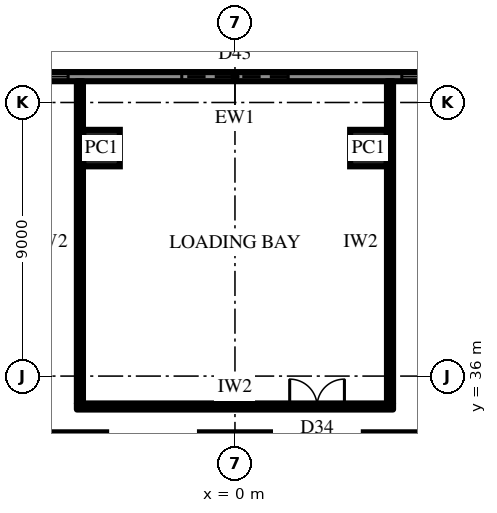
"""IFC4 building model, lengths in metres.
Left out: names, types, materials, properties, quantities, classifications, styles, units other than length and angle.
Written with IfcOpenShell. Run it as: python <this file> out.ifc"""

import sys

from ifc_helpers import new_model, si_unit, direction, frame, frame_2d, origin, origin_2d, place, context, subcontext, project, spatial, rectangle, extrude, element, fill, save


model = new_model("IFC4")
c1 = context("Model", 3, precision=1e-05, world=origin(), true_north=direction((0.0, 1.0)))
c2 = subcontext(c1, "Body", "Model", "MODEL_VIEW")
j1 = project(units=[si_unit("LENGTHUNIT", "METRE"), si_unit("PLANEANGLEUNIT", "RADIAN")], contexts=[c1])
p1 = place(None, origin())
s1 = spatial("IfcSite", under=j1, at=p1, CompositionType="ELEMENT")
p2 = place(p1, origin())
s2 = spatial("IfcBuilding", under=s1, at=p2, CompositionType="ELEMENT")
p3 = place(p2, origin())
s3 = spatial("IfcBuildingStorey", under=s2, at=p3, CompositionType="ELEMENT", Elevation=0.0)
for number, where, z_axis, x_axis in (
    (1, (5.389, 33.15, 0.0), (0.0, 0.0, 1.0), (-1.0, 0.0, 0.0)),
    (2, (0.0, 33.15, 0.0), (0.0, 0.0, 1.0), (-1.0, 0.0, 0.0)),
    (3, (-5.389, 33.15, 0.0), (0.0, 0.0, 1.0), (-1.0, 0.0, 0.0)),
):
    element("IfcColumn", number, at=place(p3, frame(where, z_axis=z_axis, x_axis=x_axis)), inside=s3, PredefinedType="COLUMN", context=c2, shape_type="SweptSolid", body=[
        extrude(rectangle(XDim=2.3, YDim=2.0, at=origin_2d()), origin(), (0.0, 0.0, 1.0), 7.0),
    ])
for number, where, z_axis, x_axis in (
    (4, (4.388, 43.5, 0.0), (0.0, 0.0, 1.0), (-1.0, 0.0, 0.0)),
    (5, (-4.388, 43.5, 0.0), (0.0, 0.0, 1.0), (-1.0, 0.0, 0.0)),
):
    element("IfcColumn", number, at=place(p3, frame(where, z_axis=z_axis, x_axis=x_axis)), inside=s3, PredefinedType="COLUMN", context=c2, shape_type="SweptSolid", body=[
        extrude(rectangle(XDim=1.2, YDim=1.2, at=origin_2d()), origin(), (0.0, 0.0, 1.0), 7.0),
    ])
p4 = place(p3, frame((21.939, 45.85, 0.0), z_axis=(0.0, 0.0, 1.0), x_axis=(-1.0, 0.0, 0.0)))
e6 = element("IfcWall", 6, at=p4, inside=s3, PredefinedType="SOLIDWALL", context=c2, shape_type="SweptSolid", body=[
    extrude(rectangle(XDim=43.878, YDim=0.3, at=frame_2d((21.939, 0.0))), origin(), (0.0, 0.0, 1.0), 6.65),
])
p5 = place(p4, frame((1.1, 0.0, 0.3)))
e7 = element("IfcOpeningElement", 7, at=p5, cuts=e6, PredefinedType="OPENING", context=c2, shape_type="SweptSolid", body=[
    extrude(rectangle(XDim=6.576, YDim=5.0, at=frame_2d((3.288, 2.5))), frame((0.0, 0.16, 0.0), z_axis=(0.0, -1.0, 0.0), x_axis=(1.0, 0.0, 0.0)), (0.0, 0.0, 1.0), 0.32),
])
p6 = place(p4, frame((9.875, 0.0, 0.0)))
e8 = element("IfcOpeningElement", 8, at=p6, cuts=e6, PredefinedType="OPENING", context=c2, shape_type="SweptSolid", body=[
    extrude(rectangle(XDim=1.8, YDim=2.4, at=frame_2d((0.9, 1.2))), frame((0.0, 0.16, 0.0), z_axis=(0.0, -1.0, 0.0), x_axis=(1.0, 0.0, 0.0)), (0.0, 0.0, 1.0), 0.32),
])
p7 = place(p4, frame((11.976, 0.0, 0.3)))
e9 = element("IfcOpeningElement", 9, at=p7, cuts=e6, PredefinedType="OPENING", context=c2, shape_type="SweptSolid", body=[
    extrude(rectangle(XDim=4.476, YDim=5.0, at=frame_2d((2.238, 2.5))), frame((0.0, 0.16, 0.0), z_axis=(0.0, -1.0, 0.0), x_axis=(1.0, 0.0, 0.0)), (0.0, 0.0, 1.0), 0.32),
])
p8 = place(p4, frame((20.189, 0.0, 0.0)))
e10 = element("IfcOpeningElement", 10, at=p8, cuts=e6, PredefinedType="OPENING", context=c2, shape_type="SweptSolid", body=[
    extrude(rectangle(XDim=3.5, YDim=4.5, at=frame_2d((1.75, 2.25))), frame((0.0, 0.16, 0.0), z_axis=(0.0, -1.0, 0.0), x_axis=(1.0, 0.0, 0.0)), (0.0, 0.0, 1.0), 0.32),
])
p9 = place(p4, frame((32.203, 0.0, 0.0)))
e11 = element("IfcOpeningElement", 11, at=p9, cuts=e6, PredefinedType="OPENING", context=c2, shape_type="SweptSolid", body=[
    extrude(rectangle(XDim=1.8, YDim=2.4, at=frame_2d((0.9, 1.2))), frame((0.0, 0.16, 0.0), z_axis=(0.0, -1.0, 0.0), x_axis=(1.0, 0.0, 0.0)), (0.0, 0.0, 1.0), 0.32),
])
p10 = place(p4, frame((27.427, 0.0, 0.3)))
e12 = element("IfcOpeningElement", 12, at=p10, cuts=e6, PredefinedType="OPENING", context=c2, shape_type="SweptSolid", body=[
    extrude(rectangle(XDim=4.476, YDim=5.0, at=frame_2d((2.238, 2.5))), frame((0.0, 0.16, 0.0), z_axis=(0.0, -1.0, 0.0), x_axis=(1.0, 0.0, 0.0)), (0.0, 0.0, 1.0), 0.32),
])
p11 = place(p4, frame((36.203, 0.0, 0.3)))
e13 = element("IfcOpeningElement", 13, at=p11, cuts=e6, PredefinedType="OPENING", context=c2, shape_type="SweptSolid", body=[
    extrude(rectangle(XDim=6.576, YDim=5.0, at=frame_2d((3.288, 2.5))), frame((0.0, 0.16, 0.0), z_axis=(0.0, -1.0, 0.0), x_axis=(1.0, 0.0, 0.0)), (0.0, 0.0, 1.0), 0.32),
])
p12 = place(p3, frame((-5.2, 35.0, 0.0), z_axis=(0.0, 0.0, 1.0), x_axis=(1.0, 0.0, 0.0)))
e14 = element("IfcWall", 14, at=p12, inside=s3, PredefinedType="PARTITIONING", context=c2, shape_type="SweptSolid", body=[
    extrude(rectangle(XDim=10.4, YDim=0.2, at=frame_2d((5.2, 0.0))), origin(), (0.0, 0.0, 1.0), 6.65),
])
p13 = place(p12, frame((7.0, 0.0, 0.0)))
e15 = element("IfcOpeningElement", 15, at=p13, cuts=e14, PredefinedType="OPENING", context=c2, shape_type="SweptSolid", body=[
    extrude(rectangle(XDim=1.8, YDim=2.4, at=frame_2d((0.9, 1.2))), frame((0.0, 0.11, 0.0), z_axis=(0.0, -1.0, 0.0), x_axis=(1.0, 0.0, 0.0)), (0.0, 0.0, 1.0), 0.22),
])
for number, where, z_axis, x_axis in (
    (16, (-5.1, 35.1, 0.0), (0.0, 0.0, 1.0), (0.0, 1.0, 0.0)),
    (17, (5.1, 35.1, 0.0), (0.0, 0.0, 1.0), (0.0, 1.0, 0.0)),
):
    element("IfcWall", number, at=place(p3, frame(where, z_axis=z_axis, x_axis=x_axis)), inside=s3, PredefinedType="PARTITIONING", context=c2, shape_type="SweptSolid", body=[
        extrude(rectangle(XDim=10.6, YDim=0.2, at=frame_2d((5.3, 0.0))), origin(), (0.0, 0.0, 1.0), 6.65),
    ])
p14 = place(p7, origin())
e18 = element("IfcWindow", 18, at=p14, inside=s3, PartitioningType="SINGLE_PANEL", PredefinedType="WINDOW", context=c2, shape_type="SweptSolid", body=[
    extrude(rectangle(XDim=4.476, YDim=5.0, at=frame_2d((2.238, 2.5))), frame((0.0, 0.03, 0.0), z_axis=(0.0, -1.0, 0.0), x_axis=(1.0, 0.0, 0.0)), (0.0, 0.0, 1.0), 0.06),
])
fill(e9, e18)
p15 = place(p8, origin())
e19 = element("IfcDoor", 19, at=p15, inside=s3, OperationType="ROLLINGUP", PredefinedType="DOOR", context=c2, shape_type="SweptSolid", body=[
    extrude(rectangle(XDim=3.5, YDim=4.5, at=frame_2d((1.75, 2.25))), frame((0.0, 0.025, 0.0), z_axis=(0.0, -1.0, 0.0), x_axis=(1.0, 0.0, 0.0)), (0.0, 0.0, 1.0), 0.05),
])
fill(e10, e19)
p16 = place(p10, origin())
e20 = element("IfcWindow", 20, at=p16, inside=s3, PartitioningType="SINGLE_PANEL", PredefinedType="WINDOW", context=c2, shape_type="SweptSolid", body=[
    extrude(rectangle(XDim=4.476, YDim=5.0, at=frame_2d((2.238, 2.5))), frame((0.0, 0.03, 0.0), z_axis=(0.0, -1.0, 0.0), x_axis=(1.0, 0.0, 0.0)), (0.0, 0.0, 1.0), 0.06),
])
fill(e12, e20)
p17 = place(p13, origin())
e21 = element("IfcDoor", 21, at=p17, inside=s3, OperationType="DOUBLE_DOOR_SINGLE_SWING", PredefinedType="DOOR", context=c2, shape_type="SweptSolid", body=[
    extrude(rectangle(XDim=1.8, YDim=2.4, at=frame_2d((0.9, 1.2))), frame((0.0, 0.025, 0.0), z_axis=(0.0, -1.0, 0.0), x_axis=(1.0, 0.0, 0.0)), (0.0, 0.0, 1.0), 0.05),
])
fill(e15, e21)
save(model, sys.argv[1])
